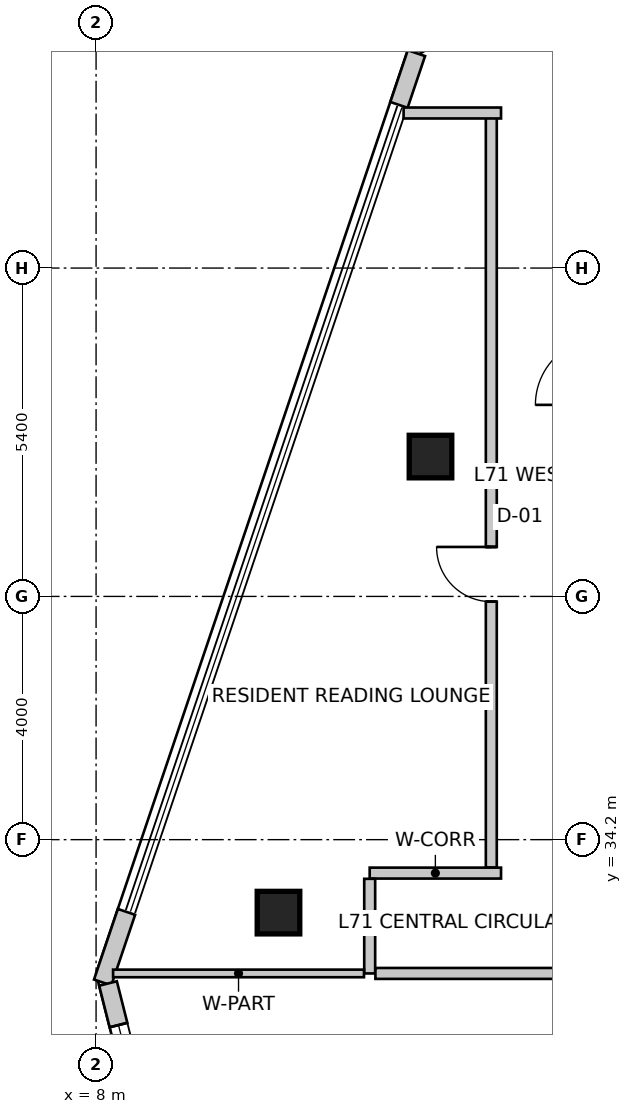
"""IFC4 building model, lengths in metres.
Left out: names, types, materials, properties, quantities, classifications, styles, units other than length and angle.
Written with IfcOpenShell. Run it as: python <this file> out.ifc"""

import sys

from ifc_helpers import new_model, si_unit, direction, frame, frame_2d, origin, origin_2d, place, context, subcontext, project, spatial, rectangle, extrude, source, transform, mapped, element, fill, save


model = new_model("IFC4")
c1 = context("Model", 3, precision=1e-05, world=origin(), true_north=direction((0.0, 1.0)))
c2 = subcontext(c1, "Body", "Model", "MODEL_VIEW")
j1 = project(units=[si_unit("LENGTHUNIT", "METRE"), si_unit("PLANEANGLEUNIT", "RADIAN")], contexts=[c1])
p1 = place(None, origin())
s1 = spatial("IfcSite", under=j1, at=p1, CompositionType="ELEMENT")
p2 = place(p1, origin())
s2 = spatial("IfcBuilding", under=s1, at=p2, CompositionType="ELEMENT")
p3 = place(p2, frame((0.0, 0.0, 278.1)))
s3 = spatial("IfcBuildingStorey", under=s2, at=p3, CompositionType="ELEMENT", Elevation=278.1)
m1 = source(origin(), c2, "Body", "SweptSolid", [
    extrude(rectangle(XDim=0.7, YDim=0.7, at=origin_2d()), origin(), (0.0, 0.0, 1.0), 3.6),
])
for number, where, z_axis, x_axis in (
    (1, (11.0, 33.0, 0.0), (0.0, 0.0, 1.0), (1.0, 0.0, 0.0)),
    (2, (13.5, 40.5, 0.0), (0.0, 0.0, 1.0), (1.0, 0.0, 0.0)),
):
    element("IfcColumn", number, at=place(p3, frame(where, z_axis=z_axis, x_axis=x_axis)), inside=s3, PredefinedType="COLUMN", context=c2, shape_type="MappedRepresentation", body=[
        mapped(m1, transform((0.0, 0.0, 0.0), scale=1.0)),
    ])
p4 = place(p3, frame((21.873, 52.741, 0.0), z_axis=(0.0, 0.0, 1.0), x_axis=(-0.843661487732, -0.536875492193, 0.0)))
e3 = element("IfcWall", 3, at=p4, inside=s3, PredefinedType="SOLIDWALL", context=c2, shape_type="SweptSolid", body=[
    extrude(rectangle(XDim=10.282, YDim=0.3, at=frame_2d((5.141, 0.0))), origin(), (0.0, 0.0, 1.0), 3.35),
])
m2 = source(origin(), c2, "Body", "SweptSolid", [
    extrude(rectangle(XDim=2.4, YDim=2.2, at=frame_2d((1.2, 1.1))), frame((0.0, 0.16, 0.0), z_axis=(0.0, -1.0, 0.0), x_axis=(1.0, 0.0, 0.0)), (0.0, 0.0, 1.0), 0.32),
])
p5 = place(p4, frame((1.26, 0.0, 0.85)))
e4 = element("IfcOpeningElement", 4, at=p5, cuts=e3, PredefinedType="OPENING", context=c2, shape_type="MappedRepresentation", body=[
    mapped(m2, transform((0.0, 0.0, 0.0), scale=1.0)),
])
m3 = source(origin(), c2, "Body", "SweptSolid", [
    extrude(rectangle(XDim=2.1, YDim=2.0, at=frame_2d((1.05, 1.0))), frame((0.0, 0.16, 0.0), z_axis=(0.0, -1.0, 0.0), x_axis=(1.0, 0.0, 0.0)), (0.0, 0.0, 1.0), 0.32),
])
p6 = place(p4, frame((5.689, 0.0, 0.85)))
e5 = element("IfcOpeningElement", 5, at=p6, cuts=e3, PredefinedType="OPENING", context=c2, shape_type="MappedRepresentation", body=[
    mapped(m3, transform((0.0, 0.0, 0.0), scale=1.0)),
])
p7 = place(p3, frame((13.269, 47.134, 0.0), z_axis=(0.0, 0.0, 1.0), x_axis=(-0.320141844474, -0.947369621329, 0.0)))
e6 = element("IfcWall", 6, at=p7, inside=s3, PredefinedType="SOLIDWALL", context=c2, shape_type="SweptSolid", body=[
    extrude(rectangle(XDim=0.897, YDim=0.3, at=frame_2d((0.449, 0.0))), origin(), (0.0, 0.0, 1.0), 3.35),
])
p8 = place(p3, frame((8.5, 33.012, 0.0), z_axis=(0.0, 0.0, 1.0), x_axis=(-0.319872574384, -0.94746057235, 0.0)))
e7 = element("IfcWall", 7, at=p8, inside=s3, PredefinedType="SOLIDWALL", context=c2, shape_type="SweptSolid", body=[
    extrude(rectangle(XDim=1.225, YDim=0.3, at=frame_2d((0.613, 0.0))), origin(), (0.0, 0.0, 1.0), 3.35),
])
p9 = place(p3, frame((8.196, 31.835, 0.0), z_axis=(0.0, 0.0, 1.0), x_axis=(0.244430846523, -0.969666726906, 0.0)))
e8 = element("IfcWall", 8, at=p9, inside=s3, PredefinedType="SOLIDWALL", context=c2, shape_type="SweptSolid", body=[
    extrude(rectangle(XDim=7.152, YDim=0.3, at=frame_2d((3.576, 0.0))), origin(), (0.0, 0.0, 1.0), 3.35),
])
p10 = place(p9, frame((0.705, 0.0, 0.85)))
e9 = element("IfcOpeningElement", 9, at=p10, cuts=e8, PredefinedType="OPENING", context=c2, shape_type="MappedRepresentation", body=[
    mapped(m2, transform((0.0, 0.0, 0.0), scale=1.0)),
])
p11 = place(p9, frame((4.181, 0.0, 0.85)))
e10 = element("IfcOpeningElement", 10, at=p11, cuts=e8, PredefinedType="OPENING", context=c2, shape_type="MappedRepresentation", body=[
    mapped(m2, transform((0.0, 0.0, 0.0), scale=1.0)),
])
p12 = place(p3, frame((12.5, 33.65, 0.0), z_axis=(0.0, 0.0, 1.0), x_axis=(1.0, 0.0, 0.0)))
e11 = element("IfcWall", 11, at=p12, inside=s3, PredefinedType="PARTITIONING", context=c2, shape_type="SweptSolid", body=[
    extrude(rectangle(XDim=2.16, YDim=0.18, at=frame_2d((1.08, 0.0))), origin(), (0.0, 0.0, 1.0), 3.35),
])
p13 = place(p3, frame((12.5, 32.0, 0.0), z_axis=(0.0, 0.0, 1.0), x_axis=(0.0, 1.0, 0.0)))
e12 = element("IfcWall", 12, at=p13, inside=s3, PredefinedType="PARTITIONING", context=c2, shape_type="SweptSolid", body=[
    extrude(rectangle(XDim=1.556, YDim=0.18, at=frame_2d((0.778, 0.0))), origin(), (0.0, 0.0, 1.0), 3.034),
])
p14 = place(p3, frame((26.065, 32.0, 0.0), z_axis=(0.0, 0.0, 1.0), x_axis=(-1.0, 0.0, 0.0)))
e13 = element("IfcWall", 13, at=p14, inside=s3, PredefinedType="PARTITIONING", context=c2, shape_type="SweptSolid", body=[
    extrude(rectangle(XDim=13.471, YDim=0.18, at=frame_2d((6.736, 0.0))), origin(), (0.0, 0.0, 1.0), 3.034),
])
m4 = source(origin(), c2, "Body", "SweptSolid", [
    extrude(rectangle(XDim=1.4, YDim=2.15, at=frame_2d((0.7, 1.075))), frame((0.0, 0.1, 0.0), z_axis=(0.0, -1.0, 0.0), x_axis=(1.0, 0.0, 0.0)), (0.0, 0.0, 1.0), 0.2),
])
p15 = place(p14, frame((5.975, 0.0, 0.0)))
e14 = element("IfcOpeningElement", 14, at=p15, cuts=e13, PredefinedType="OPENING", context=c2, shape_type="MappedRepresentation", body=[
    mapped(m4, transform((0.0, 0.0, 0.0), scale=1.0)),
])
p16 = place(p3, frame((14.5, 33.744, 0.0), z_axis=(0.0, 0.0, 1.0), x_axis=(0.0, 1.0, 0.0)))
e15 = element("IfcWall", 15, at=p16, inside=s3, PredefinedType="PARTITIONING", context=c2, shape_type="SweptSolid", body=[
    extrude(rectangle(XDim=12.406, YDim=0.18, at=frame_2d((6.203, 0.0))), origin(), (0.0, 0.0, 1.0), 3.35),
])
m5 = source(origin(), c2, "Body", "SweptSolid", [
    extrude(rectangle(XDim=0.9, YDim=2.15, at=frame_2d((0.45, 1.075))), frame((0.0, 0.1, 0.0), z_axis=(0.0, -1.0, 0.0), x_axis=(1.0, 0.0, 0.0)), (0.0, 0.0, 1.0), 0.2),
])
p17 = place(p16, frame((4.37, 0.0, 0.0)))
e16 = element("IfcOpeningElement", 16, at=p17, cuts=e15, PredefinedType="OPENING", context=c2, shape_type="MappedRepresentation", body=[
    mapped(m5, transform((0.0, 0.0, 0.0), scale=1.0)),
])
p18 = place(p3, frame((14.66, 46.15, 0.0), z_axis=(0.0, 0.0, 1.0), x_axis=(-1.0, 0.0, 0.0)))
e17 = element("IfcWall", 17, at=p18, inside=s3, PredefinedType="PARTITIONING", context=c2, shape_type="SweptSolid", body=[
    extrude(rectangle(XDim=1.602, YDim=0.18, at=frame_2d((0.801, 0.0))), origin(), (0.0, 0.0, 1.0), 3.35),
])
p19 = place(p3, frame((12.406, 32.0, 0.0), z_axis=(0.0, 0.0, 1.0), x_axis=(-1.0, 0.0, 0.0)))
e18 = element("IfcWall", 18, at=p19, inside=s3, PredefinedType="PARTITIONING", context=c2, shape_type="SweptSolid", body=[
    extrude(rectangle(XDim=4.126, YDim=0.125, at=frame_2d((2.063, 0.0))), origin(), (0.0, 0.0, 1.0), 2.642),
])
m6 = source(origin(), c2, "Body", "SweptSolid", [
    extrude(rectangle(XDim=2.4, YDim=2.2, at=frame_2d((1.2, 1.1))), frame((0.0, -0.015, 0.0), z_axis=(0.0, -1.0, 0.0), x_axis=(1.0, 0.0, 0.0)), (0.0, 0.0, 1.0), 0.06),
])
p20 = place(p10, origin())
e19 = element("IfcWindow", 19, at=p20, inside=s3, PartitioningType="SINGLE_PANEL", PredefinedType="WINDOW", context=c2, shape_type="MappedRepresentation", body=[
    mapped(m6, transform((0.0, 0.0, 0.0), scale=1.0)),
])
fill(e9, e19)
m7 = source(origin(), c2, "Body", "SweptSolid", [
    extrude(rectangle(XDim=0.9, YDim=2.15, at=frame_2d((0.45, 1.075))), frame((0.0, 0.025, 0.0), z_axis=(0.0, -1.0, 0.0), x_axis=(1.0, 0.0, 0.0)), (0.0, 0.0, 1.0), 0.05),
])
p21 = place(p17, origin())
e20 = element("IfcDoor", 20, at=p21, inside=s3, OperationType="SINGLE_SWING_RIGHT", PredefinedType="DOOR", context=c2, shape_type="MappedRepresentation", body=[
    mapped(m7, transform((0.0, 0.0, 0.0), scale=1.0)),
])
fill(e16, e20)
save(model, sys.argv[1])
